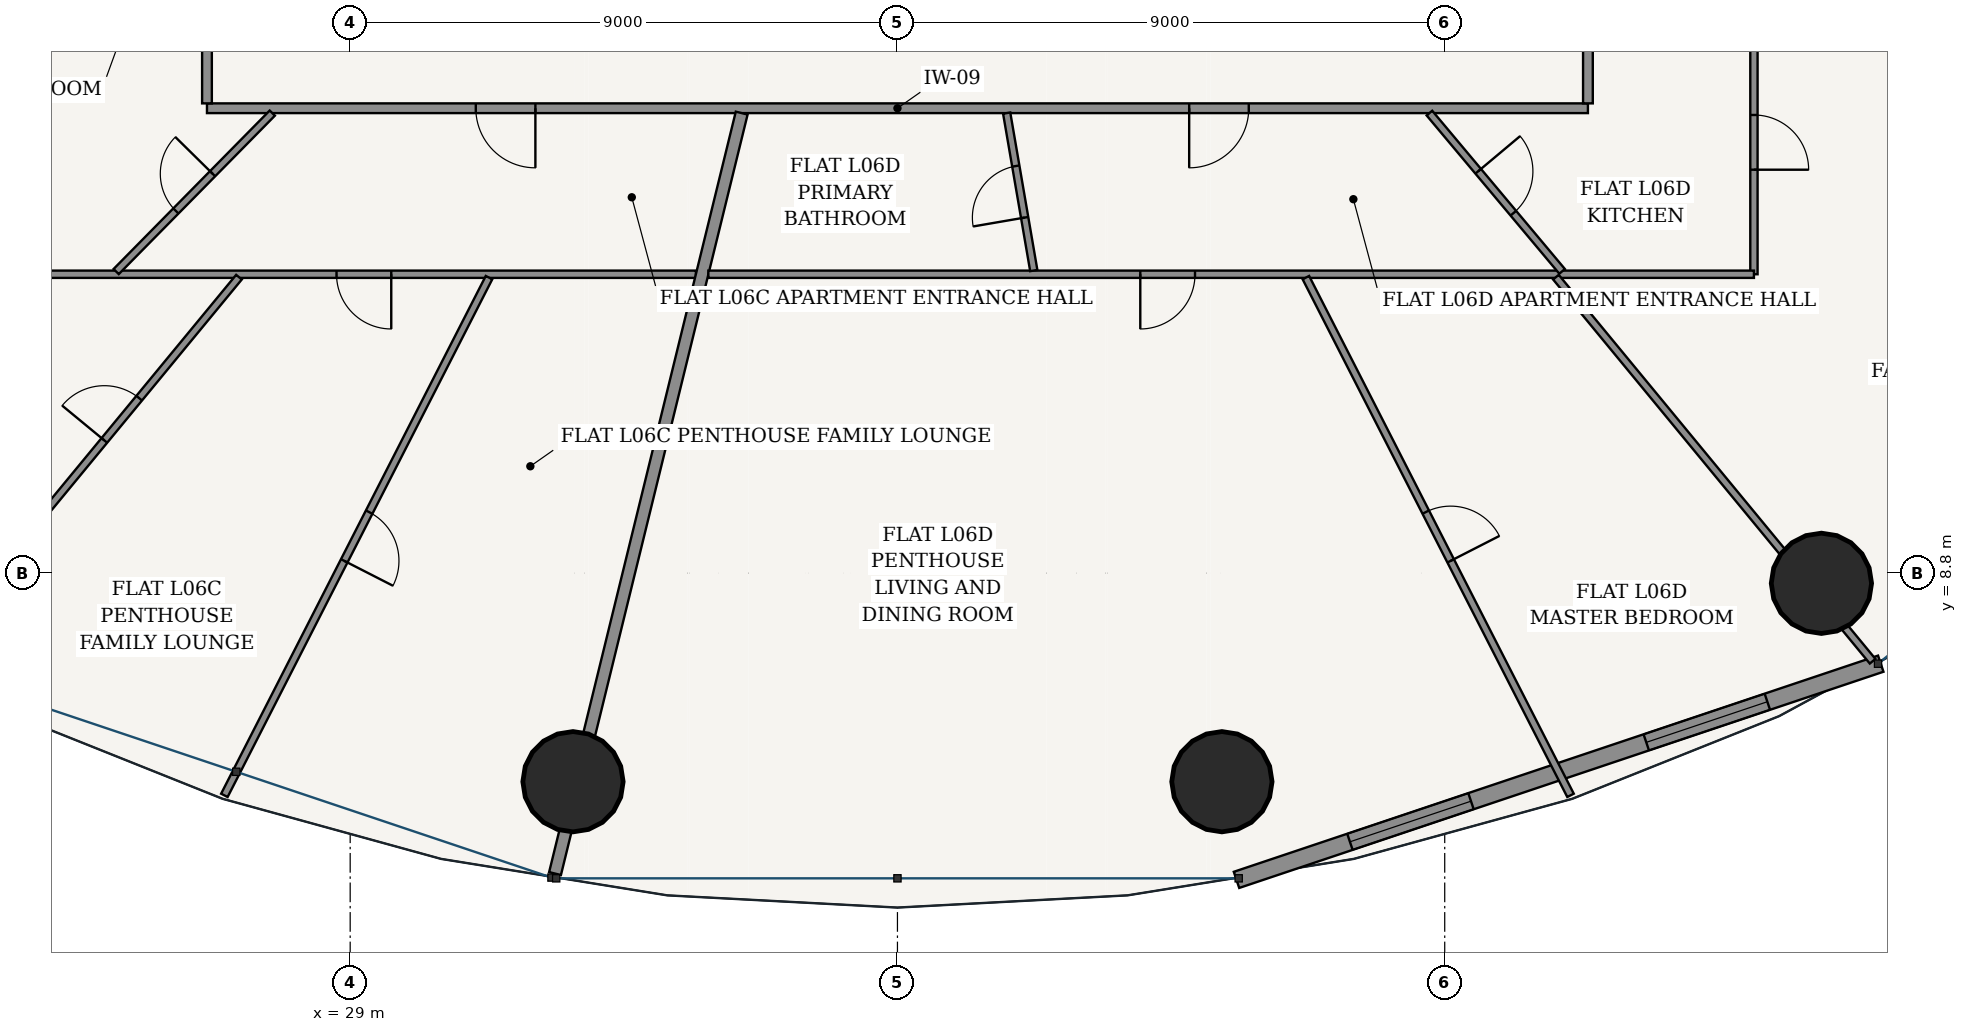
"""IFC4 building model, lengths in metres.
Left out: names, types, materials, properties, quantities, classifications, styles, units other than length and angle.
Written with IfcOpenShell. Run it as: python <this file> out.ifc"""

import sys

from ifc_helpers import new_model, si_unit, direction, frame, frame_2d, origin, origin_2d, place, context, subcontext, project, spatial, rectangle, hollow_circle, extrude, source, transform, mapped, element, fill, save


model = new_model("IFC4")
c1 = context("Model", 3, precision=1e-05, world=origin(), true_north=direction((-0.2419218956, 0.970295726276)))
c2 = subcontext(c1, "Body", "Model", "MODEL_VIEW")
j1 = project(units=[si_unit("LENGTHUNIT", "METRE"), si_unit("PLANEANGLEUNIT", "RADIAN")], contexts=[c1])
p1 = place(None, origin())
s1 = spatial("IfcSite", under=j1, at=p1, CompositionType="ELEMENT")
p2 = place(p1, origin())
s2 = spatial("IfcBuilding", under=s1, at=p2, CompositionType="ELEMENT")
p3 = place(p2, frame((0.0, 0.0, 27.6)))
s3 = spatial("IfcBuildingStorey", under=s2, at=p3, CompositionType="ELEMENT", Elevation=27.6)
for number, where, z_axis, x_axis in (
    (1, (32.664, 5.37, 0.0), (0.0, 0.0, 1.0), (1.0, 0.0, 0.0)),
    (2, (43.336, 5.37, 0.0), (0.0, 0.0, 1.0), (1.0, 0.0, 0.0)),
    (3, (53.195, 8.632, 0.0), (0.0, 0.0, 1.0), (1.0, 0.0, 0.0)),
):
    element("IfcColumn", number, at=place(p3, frame(where, z_axis=z_axis, x_axis=x_axis)), inside=s3, PredefinedType="COLUMN", context=c2, shape_type="SweptSolid", body=[
        extrude(hollow_circle(Radius=0.825, WallThickness=0.05, at=origin_2d()), origin(), (0.0, 0.0, 1.0), 3.6),
    ])
p4 = place(p3, frame((43.576, 3.756, 0.0), z_axis=(0.0, 0.0, 1.0), x_axis=(0.948047847546, 0.31812777113, 0.0)))
e4 = element("IfcWall", 4, at=p4, inside=s3, PredefinedType="SOLIDWALL", context=c2, shape_type="SweptSolid", body=[
    extrude(rectangle(XDim=11.175, YDim=0.28, at=frame_2d((5.588, 0.0))), origin(), (0.0, 0.0, 1.0), 3.32),
])
p5 = place(p4, frame((1.967, 0.0, 0.85)))
e5 = element("IfcOpeningElement", 5, at=p5, cuts=e4, PredefinedType="OPENING", context=c2, shape_type="SweptSolid", body=[
    extrude(rectangle(XDim=2.1, YDim=1.95, at=frame_2d((1.05, 0.975))), frame((0.0, 0.15, 0.0), z_axis=(0.0, -1.0, 0.0), x_axis=(1.0, 0.0, 0.0)), (0.0, 0.0, 1.0), 0.3),
])
p6 = place(p4, frame((7.108, 0.0, 0.85)))
e6 = element("IfcOpeningElement", 6, at=p6, cuts=e4, PredefinedType="OPENING", context=c2, shape_type="SweptSolid", body=[
    extrude(rectangle(XDim=2.1, YDim=1.95, at=frame_2d((1.05, 0.975))), frame((0.0, 0.15, 0.0), z_axis=(0.0, -1.0, 0.0), x_axis=(1.0, 0.0, 0.0)), (0.0, 0.0, 1.0), 0.3),
])
p7 = place(p3, frame((26.645, 16.445, 0.0), z_axis=(0.0, 0.0, 1.0), x_axis=(1.0, 0.0, 0.0)))
e7 = element("IfcWall", 7, at=p7, inside=s3, PredefinedType="PARTITIONING", context=c2, shape_type="SweptSolid", body=[
    extrude(rectangle(XDim=22.71, YDim=0.16, at=frame_2d((11.355, 0.0))), origin(), (0.0, 0.0, 1.0), 2.688),
])
p8 = place(p7, frame((4.421, 0.0, 0.0)))
e8 = element("IfcOpeningElement", 8, at=p8, cuts=e7, PredefinedType="OPENING", context=c2, shape_type="SweptSolid", body=[
    extrude(rectangle(XDim=0.98, YDim=2.2, at=frame_2d((0.49, 1.1))), frame((0.0, 0.09, 0.0), z_axis=(0.0, -1.0, 0.0), x_axis=(1.0, 0.0, 0.0)), (0.0, 0.0, 1.0), 0.18),
])
p9 = place(p7, frame((16.153, 0.0, 0.0)))
e9 = element("IfcOpeningElement", 9, at=p9, cuts=e7, PredefinedType="OPENING", context=c2, shape_type="SweptSolid", body=[
    extrude(rectangle(XDim=0.98, YDim=2.2, at=frame_2d((0.49, 1.1))), frame((0.0, 0.09, 0.0), z_axis=(0.0, -1.0, 0.0), x_axis=(1.0, 0.0, 0.0)), (0.0, 0.0, 1.0), 0.18),
])
p10 = place(p3, frame((26.645, 16.525, 0.0), z_axis=(0.0, 0.0, 1.0), x_axis=(0.0, 1.0, 0.0)))
e10 = element("IfcWall", 10, at=p10, inside=s3, PredefinedType="PARTITIONING", context=c2, shape_type="SweptSolid", body=[
    extrude(rectangle(XDim=20.55, YDim=0.16, at=frame_2d((10.275, 0.0))), origin(), (0.0, 0.0, 1.0), 2.688),
])
p11 = place(p3, frame((49.355, 16.525, 0.0), z_axis=(0.0, 0.0, 1.0), x_axis=(0.0, 1.0, 0.0)))
e11 = element("IfcWall", 11, at=p11, inside=s3, PredefinedType="PARTITIONING", context=c2, shape_type="SweptSolid", body=[
    extrude(rectangle(XDim=20.55, YDim=0.16, at=frame_2d((10.275, 0.0))), origin(), (0.0, 0.0, 1.0), 2.688),
])
p12 = place(p11, frame((15.635, 0.0, 0.0)))
e12 = element("IfcOpeningElement", 12, at=p12, cuts=e11, PredefinedType="OPENING", context=c2, shape_type="SweptSolid", body=[
    extrude(rectangle(XDim=0.98, YDim=2.2, at=frame_2d((0.49, 1.1))), frame((0.0, 0.09, 0.0), z_axis=(0.0, -1.0, 0.0), x_axis=(1.0, 0.0, 0.0)), (0.0, 0.0, 1.0), 0.18),
])
p13 = place(p3, frame((34.686, 13.715, 0.0), z_axis=(0.0, 0.0, 1.0), x_axis=(-1.0, 0.0, 0.0)))
e13 = element("IfcWall", 13, at=p13, inside=s3, PredefinedType="PARTITIONING", context=c2, shape_type="SweptSolid", body=[
    extrude(rectangle(XDim=10.771, YDim=0.12, at=frame_2d((5.385, 0.0))), origin(), (0.0, 0.0, 1.0), 2.688),
])
p14 = place(p13, frame((5.01, 0.0, 0.0)))
e14 = element("IfcOpeningElement", 14, at=p14, cuts=e13, PredefinedType="OPENING", context=c2, shape_type="SweptSolid", body=[
    extrude(rectangle(XDim=0.9, YDim=2.15, at=frame_2d((0.45, 1.075))), frame((0.0, 0.07, 0.0), z_axis=(0.0, -1.0, 0.0), x_axis=(1.0, 0.0, 0.0)), (0.0, 0.0, 1.0), 0.14),
])
p15 = place(p3, frame((27.171, 13.667, 0.0), z_axis=(0.0, 0.0, 1.0), x_axis=(-0.636177533893, -0.771542704826, 0.0)))
e15 = element("IfcWall", 15, at=p15, inside=s3, PredefinedType="PARTITIONING", context=c2, shape_type="SweptSolid", body=[
    extrude(rectangle(XDim=8.187, YDim=0.12, at=frame_2d((4.093, 0.0))), origin(), (0.0, 0.0, 1.0), 2.688),
])
p16 = place(p15, frame((2.579, 0.0, 0.0)))
e16 = element("IfcOpeningElement", 16, at=p16, cuts=e15, PredefinedType="OPENING", context=c2, shape_type="SweptSolid", body=[
    extrude(rectangle(XDim=0.9, YDim=2.15, at=frame_2d((0.45, 1.075))), frame((0.0, 0.07, 0.0), z_axis=(0.0, -1.0, 0.0), x_axis=(1.0, 0.0, 0.0)), (0.0, 0.0, 1.0), 0.14),
])
p17 = place(p3, frame((31.283, 13.66, 0.0), z_axis=(0.0, 0.0, 1.0), x_axis=(-0.455131303234, -0.890424335256, 0.0)))
e17 = element("IfcWall", 17, at=p17, inside=s3, PredefinedType="PARTITIONING", context=c2, shape_type="SweptSolid", body=[
    extrude(rectangle(XDim=9.562, YDim=0.12, at=frame_2d((4.781, 0.0))), origin(), (0.0, 0.0, 1.0), 2.762),
])
p18 = place(p17, frame((4.331, 0.0, 0.0)))
e18 = element("IfcOpeningElement", 18, at=p18, cuts=e17, PredefinedType="OPENING", context=c2, shape_type="SweptSolid", body=[
    extrude(rectangle(XDim=0.9, YDim=2.15, at=frame_2d((0.45, 1.075))), frame((0.0, 0.07, 0.0), z_axis=(0.0, -1.0, 0.0), x_axis=(1.0, 0.0, 0.0)), (0.0, 0.0, 1.0), 0.14),
])
p19 = place(p3, frame((27.719, 16.365, 0.0), z_axis=(0.0, 0.0, 1.0), x_axis=(-0.701848204267, -0.712326539002, 0.0)))
e19 = element("IfcWall", 19, at=p19, inside=s3, PredefinedType="PARTITIONING", context=c2, shape_type="SweptSolid", body=[
    extrude(rectangle(XDim=3.658, YDim=0.12, at=frame_2d((1.829, 0.0))), origin(), (0.0, 0.0, 1.0), 2.688),
])
p20 = place(p19, frame((1.399, 0.0, 0.0)))
e20 = element("IfcOpeningElement", 20, at=p20, cuts=e19, PredefinedType="OPENING", context=c2, shape_type="SweptSolid", body=[
    extrude(rectangle(XDim=0.86, YDim=2.15, at=frame_2d((0.43, 1.075))), frame((0.0, 0.07, 0.0), z_axis=(0.0, -1.0, 0.0), x_axis=(1.0, 0.0, 0.0)), (0.0, 0.0, 1.0), 0.14),
])
p21 = place(p3, frame((35.438, 16.365, 0.0), z_axis=(0.0, 0.0, 1.0), x_axis=(-0.238380116209, -0.971171931326, 0.0)))
e21 = element("IfcWall", 21, at=p21, inside=s3, PredefinedType="PARTITIONING", context=c2, shape_type="SweptSolid", body=[
    extrude(rectangle(XDim=12.877, YDim=0.2, at=frame_2d((6.438, 0.0))), origin(), (0.0, 0.0, 1.0), 2.688),
])
p22 = place(p3, frame((52.085, 24.428, 0.0), z_axis=(0.0, 0.0, 1.0), x_axis=(0.0, -1.0, 0.0)))
e22 = element("IfcWall", 22, at=p22, inside=s3, PredefinedType="PARTITIONING", context=c2, shape_type="SweptSolid", body=[
    extrude(rectangle(XDim=10.713, YDim=0.12, at=frame_2d((5.356, 0.0))), origin(), (0.0, 0.0, 1.0), 2.688),
])
p23 = place(p22, frame((8.094, 0.0, 0.0)))
e23 = element("IfcOpeningElement", 23, at=p23, cuts=e22, PredefinedType="OPENING", context=c2, shape_type="SweptSolid", body=[
    extrude(rectangle(XDim=0.9, YDim=2.15, at=frame_2d((0.45, 1.075))), frame((0.0, 0.07, 0.0), z_axis=(0.0, -1.0, 0.0), x_axis=(1.0, 0.0, 0.0)), (0.0, 0.0, 1.0), 0.14),
])
p24 = place(p3, frame((52.085, 13.715, 0.0), z_axis=(0.0, 0.0, 1.0), x_axis=(-1.0, 0.0, 0.0)))
e24 = element("IfcWall", 24, at=p24, inside=s3, PredefinedType="PARTITIONING", context=c2, shape_type="SweptSolid", body=[
    extrude(rectangle(XDim=17.195, YDim=0.12, at=frame_2d((8.597, 0.0))), origin(), (0.0, 0.0, 1.0), 2.688),
])
p25 = place(p24, frame((9.191, 0.0, 0.0)))
e25 = element("IfcOpeningElement", 25, at=p25, cuts=e24, PredefinedType="OPENING", context=c2, shape_type="SweptSolid", body=[
    extrude(rectangle(XDim=0.9, YDim=2.15, at=frame_2d((0.45, 1.075))), frame((0.0, 0.07, 0.0), z_axis=(0.0, -1.0, 0.0), x_axis=(1.0, 0.0, 0.0)), (0.0, 0.0, 1.0), 0.14),
])
p26 = place(p3, frame((44.717, 13.66, 0.0), z_axis=(0.0, 0.0, 1.0), x_axis=(0.455131303234, -0.890424335256, 0.0)))
e26 = element("IfcWall", 26, at=p26, inside=s3, PredefinedType="PARTITIONING", context=c2, shape_type="SweptSolid", body=[
    extrude(rectangle(XDim=9.562, YDim=0.12, at=frame_2d((4.781, 0.0))), origin(), (0.0, 0.0, 1.0), 2.762),
])
p27 = place(p26, frame((4.331, 0.0, 0.0)))
e27 = element("IfcOpeningElement", 27, at=p27, cuts=e26, PredefinedType="OPENING", context=c2, shape_type="SweptSolid", body=[
    extrude(rectangle(XDim=0.9, YDim=2.15, at=frame_2d((0.45, 1.075))), frame((0.0, 0.07, 0.0), z_axis=(0.0, -1.0, 0.0), x_axis=(1.0, 0.0, 0.0)), (0.0, 0.0, 1.0), 0.14),
])
p28 = place(p3, frame((48.829, 13.667, 0.0), z_axis=(0.0, 0.0, 1.0), x_axis=(0.636177533893, -0.771542704826, 0.0)))
e28 = element("IfcWall", 28, at=p28, inside=s3, PredefinedType="PARTITIONING", context=c2, shape_type="SweptSolid", body=[
    extrude(rectangle(XDim=8.187, YDim=0.12, at=frame_2d((4.093, 0.0))), origin(), (0.0, 0.0, 1.0), 2.688),
])
p29 = place(p3, frame((52.139, 19.144, 0.0), z_axis=(0.0, 0.0, 1.0), x_axis=(0.879372452045, -0.476134529922, 0.0)))
e29 = element("IfcWall", 29, at=p29, inside=s3, PredefinedType="PARTITIONING", context=c2, shape_type="SweptSolid", body=[
    extrude(rectangle(XDim=11.219, YDim=0.12, at=frame_2d((5.61, 0.0))), origin(), (0.0, 0.0, 1.0), 2.688),
])
p30 = place(p29, frame((4.097, 0.0, 0.0)))
e30 = element("IfcOpeningElement", 30, at=p30, cuts=e29, PredefinedType="OPENING", context=c2, shape_type="SweptSolid", body=[
    extrude(rectangle(XDim=0.9, YDim=2.15, at=frame_2d((0.45, 1.075))), frame((0.0, 0.07, 0.0), z_axis=(0.0, -1.0, 0.0), x_axis=(1.0, 0.0, 0.0)), (0.0, 0.0, 1.0), 0.14),
])
p31 = place(p3, frame((39.796, 16.365, 0.0), z_axis=(0.0, 0.0, 1.0), x_axis=(0.169611246875, -0.985511047596, 0.0)))
e31 = element("IfcWall", 31, at=p31, inside=s3, PredefinedType="PARTITIONING", context=c2, shape_type="SweptSolid", body=[
    extrude(rectangle(XDim=2.627, YDim=0.12, at=frame_2d((1.313, 0.0))), origin(), (0.0, 0.0, 1.0), 3.32),
])
p32 = place(p31, frame((0.884, 0.0, 0.0)))
e32 = element("IfcOpeningElement", 32, at=p32, cuts=e31, PredefinedType="OPENING", context=c2, shape_type="SweptSolid", body=[
    extrude(rectangle(XDim=0.86, YDim=2.15, at=frame_2d((0.43, 1.075))), frame((0.0, 0.07, 0.0), z_axis=(0.0, -1.0, 0.0), x_axis=(1.0, 0.0, 0.0)), (0.0, 0.0, 1.0), 0.14),
])
p33 = place(p3, frame((46.749, 16.365, 0.0), z_axis=(0.0, 0.0, 1.0), x_axis=(0.64245841772, -0.766320547487, 0.0)))
e33 = element("IfcWall", 33, at=p33, inside=s3, PredefinedType="PARTITIONING", context=c2, shape_type="SweptSolid", body=[
    extrude(rectangle(XDim=3.396, YDim=0.12, at=frame_2d((1.698, 0.0))), origin(), (0.0, 0.0, 1.0), 3.32),
])
p34 = place(p33, frame((1.248, 0.0, 0.0)))
e34 = element("IfcOpeningElement", 34, at=p34, cuts=e33, PredefinedType="OPENING", context=c2, shape_type="SweptSolid", body=[
    extrude(rectangle(XDim=0.9, YDim=2.15, at=frame_2d((0.45, 1.075))), frame((0.0, 0.07, 0.0), z_axis=(0.0, -1.0, 0.0), x_axis=(1.0, 0.0, 0.0)), (0.0, 0.0, 1.0), 0.14),
])
m1 = source(origin(), c2, "Body", "SweptSolid", [
    extrude(rectangle(XDim=2.1, YDim=1.95, at=frame_2d((1.05, 0.975))), frame((0.0, 0.03, 0.0), z_axis=(0.0, -1.0, 0.0), x_axis=(1.0, 0.0, 0.0)), (0.0, 0.0, 1.0), 0.06),
])
p35 = place(p5, origin())
e35 = element("IfcWindow", 35, at=p35, inside=s3, PartitioningType="SINGLE_PANEL", PredefinedType="WINDOW", context=c2, shape_type="MappedRepresentation", body=[
    mapped(m1, transform((0.0, 0.0, 0.0), scale=1.0)),
])
fill(e5, e35)
p36 = place(p6, origin())
e36 = element("IfcWindow", 36, at=p36, inside=s3, PartitioningType="SINGLE_PANEL", PredefinedType="WINDOW", context=c2, shape_type="MappedRepresentation", body=[
    mapped(m1, transform((0.0, 0.0, 0.0), scale=1.0)),
])
fill(e6, e36)
m2 = source(origin(), c2, "Body", "SweptSolid", [
    extrude(rectangle(XDim=0.98, YDim=2.2, at=frame_2d((0.49, 1.1))), frame((0.0, 0.025, 0.0), z_axis=(0.0, -1.0, 0.0), x_axis=(1.0, 0.0, 0.0)), (0.0, 0.0, 1.0), 0.05),
])
p37 = place(p8, frame((0.98, 0.0, 0.0), z_axis=(0.0, 0.0, 1.0), x_axis=(-1.0, 0.0, 0.0)))
e37 = element("IfcDoor", 37, at=p37, inside=s3, OperationType="SINGLE_SWING_LEFT", PredefinedType="DOOR", context=c2, shape_type="MappedRepresentation", body=[
    mapped(m2, transform((0.0, 0.0, 0.0), scale=1.0)),
])
fill(e8, e37)
m3 = source(origin(), c2, "Body", "SweptSolid", [
    extrude(rectangle(XDim=0.86, YDim=2.15, at=frame_2d((0.43, 1.075))), frame((0.0, 0.025, 0.0), z_axis=(0.0, -1.0, 0.0), x_axis=(1.0, 0.0, 0.0)), (0.0, 0.0, 1.0), 0.05),
])
p38 = place(p20, frame((0.86, 0.0, 0.0), z_axis=(0.0, 0.0, 1.0), x_axis=(-1.0, 0.0, 0.0)))
e38 = element("IfcDoor", 38, at=p38, inside=s3, OperationType="SINGLE_SWING_RIGHT", PredefinedType="DOOR", context=c2, shape_type="MappedRepresentation", body=[
    mapped(m3, transform((0.0, 0.0, 0.0), scale=1.0)),
])
fill(e20, e38)
m4 = source(origin(), c2, "Body", "SweptSolid", [
    extrude(rectangle(XDim=0.9, YDim=2.15, at=frame_2d((0.45, 1.075))), frame((0.0, 0.025, 0.0), z_axis=(0.0, -1.0, 0.0), x_axis=(1.0, 0.0, 0.0)), (0.0, 0.0, 1.0), 0.05),
])
p39 = place(p14, origin())
e39 = element("IfcDoor", 39, at=p39, inside=s3, OperationType="SINGLE_SWING_LEFT", PredefinedType="DOOR", context=c2, shape_type="MappedRepresentation", body=[
    mapped(m4, transform((0.0, 0.0, 0.0), scale=1.0)),
])
fill(e14, e39)
p40 = place(p18, origin())
e40 = element("IfcDoor", 40, at=p40, inside=s3, OperationType="SINGLE_SWING_RIGHT", PredefinedType="DOOR", context=c2, shape_type="MappedRepresentation", body=[
    mapped(m4, transform((0.0, 0.0, 0.0), scale=1.0)),
])
fill(e18, e40)
p41 = place(p16, frame((0.9, 0.0, 0.0), z_axis=(0.0, 0.0, 1.0), x_axis=(-1.0, 0.0, 0.0)))
e41 = element("IfcDoor", 41, at=p41, inside=s3, OperationType="SINGLE_SWING_LEFT", PredefinedType="DOOR", context=c2, shape_type="MappedRepresentation", body=[
    mapped(m4, transform((0.0, 0.0, 0.0), scale=1.0)),
])
fill(e16, e41)
p42 = place(p9, frame((0.98, 0.0, 0.0), z_axis=(0.0, 0.0, 1.0), x_axis=(-1.0, 0.0, 0.0)))
e42 = element("IfcDoor", 42, at=p42, inside=s3, OperationType="SINGLE_SWING_RIGHT", PredefinedType="DOOR", context=c2, shape_type="MappedRepresentation", body=[
    mapped(m2, transform((0.0, 0.0, 0.0), scale=1.0)),
])
fill(e9, e42)
p43 = place(p32, frame((0.86, 0.0, 0.0), z_axis=(0.0, 0.0, 1.0), x_axis=(-1.0, 0.0, 0.0)))
e43 = element("IfcDoor", 43, at=p43, inside=s3, OperationType="SINGLE_SWING_LEFT", PredefinedType="DOOR", context=c2, shape_type="MappedRepresentation", body=[
    mapped(m3, transform((0.0, 0.0, 0.0), scale=1.0)),
])
fill(e32, e43)
p44 = place(p25, origin())
e44 = element("IfcDoor", 44, at=p44, inside=s3, OperationType="SINGLE_SWING_RIGHT", PredefinedType="DOOR", context=c2, shape_type="MappedRepresentation", body=[
    mapped(m4, transform((0.0, 0.0, 0.0), scale=1.0)),
])
fill(e25, e44)
p45 = place(p34, origin())
e45 = element("IfcDoor", 45, at=p45, inside=s3, OperationType="SINGLE_SWING_LEFT", PredefinedType="DOOR", context=c2, shape_type="MappedRepresentation", body=[
    mapped(m4, transform((0.0, 0.0, 0.0), scale=1.0)),
])
fill(e34, e45)
p46 = place(p23, origin())
e46 = element("IfcDoor", 46, at=p46, inside=s3, OperationType="SINGLE_SWING_RIGHT", PredefinedType="DOOR", context=c2, shape_type="MappedRepresentation", body=[
    mapped(m4, transform((0.0, 0.0, 0.0), scale=1.0)),
])
fill(e23, e46)
p47 = place(p27, origin())
e47 = element("IfcDoor", 47, at=p47, inside=s3, OperationType="SINGLE_SWING_RIGHT", PredefinedType="DOOR", context=c2, shape_type="MappedRepresentation", body=[
    mapped(m4, transform((0.0, 0.0, 0.0), scale=1.0)),
])
fill(e27, e47)
save(model, sys.argv[1])
